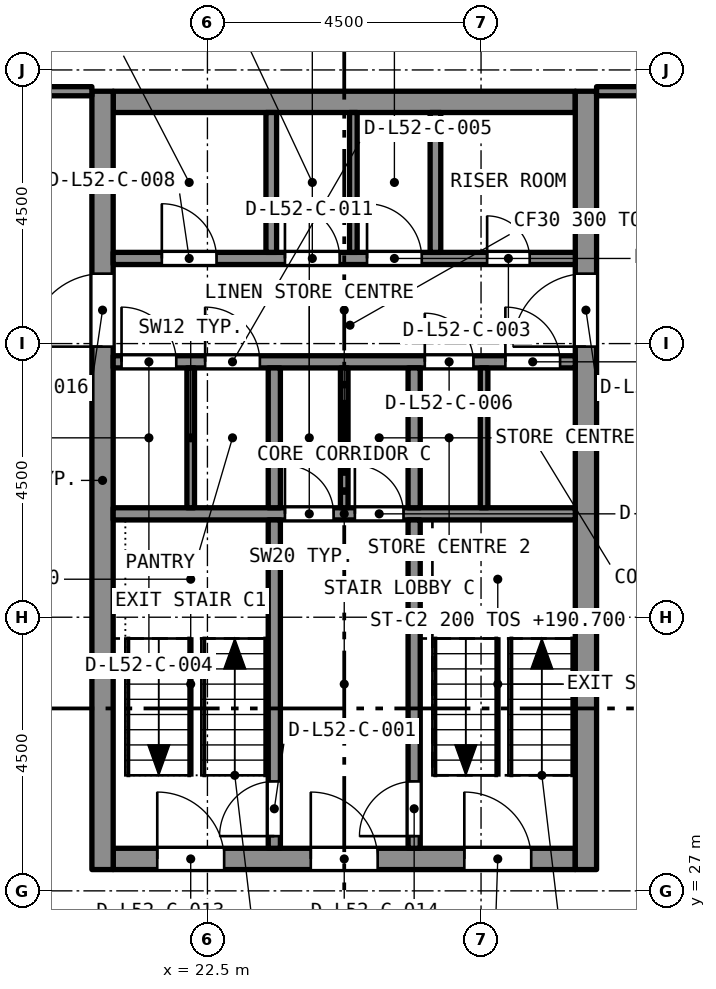
"""IFC4 building model, lengths in metres.
Left out: names, types, materials, properties, quantities, classifications, styles, units other than length and angle.
Written with IfcOpenShell. Run it as: python <this file> out.ifc"""

import sys

from ifc_helpers import new_model, si_unit, direction, frame, frame_2d, origin, place, context, subcontext, project, spatial, rectangle, extrude, element, fill, save


model = new_model("IFC4")
c1 = context("Model", 3, precision=1e-05, world=origin(), true_north=direction((0.0, 1.0)))
c2 = subcontext(c1, "Body", "Model", "MODEL_VIEW")
j1 = project(units=[si_unit("LENGTHUNIT", "METRE"), si_unit("PLANEANGLEUNIT", "RADIAN")], contexts=[c1])
p1 = place(None, origin())
s1 = spatial("IfcSite", under=j1, at=p1, CompositionType="ELEMENT")
p2 = place(p1, origin())
s2 = spatial("IfcBuilding", under=s1, at=p2, CompositionType="ELEMENT")
p3 = place(p2, frame((0.0, 0.0, 189.1)))
s3 = spatial("IfcBuildingStorey", under=s2, at=p3, CompositionType="ELEMENT", Elevation=189.1)
p4 = place(p3, frame((20.95, 27.525, 0.0), z_axis=(0.0, 0.0, 1.0), x_axis=(1.0, 0.0, 0.0)))
e1 = element("IfcWall", 1, at=p4, inside=s3, PredefinedType="SOLIDWALL", context=c2, shape_type="SweptSolid", body=[
    extrude(rectangle(XDim=7.6, YDim=0.35, at=frame_2d((3.8, 0.0))), origin(), (0.0, 0.0, 1.0), 3.2),
])
p5 = place(p4, frame((0.725, 0.0, 0.0)))
e2 = element("IfcOpeningElement", 2, at=p5, cuts=e1, PredefinedType="OPENING", context=c2, shape_type="SweptSolid", body=[
    extrude(rectangle(XDim=1.1, YDim=2.1, at=frame_2d((0.55, 1.05))), frame((0.0, 0.185, 0.0), z_axis=(0.0, -1.0, 0.0), x_axis=(1.0, 0.0, 0.0)), (0.0, 0.0, 1.0), 0.37),
])
p6 = place(p4, frame((3.25, 0.0, 0.0)))
e3 = element("IfcOpeningElement", 3, at=p6, cuts=e1, PredefinedType="OPENING", context=c2, shape_type="SweptSolid", body=[
    extrude(rectangle(XDim=1.1, YDim=2.1, at=frame_2d((0.55, 1.05))), frame((0.0, 0.185, 0.0), z_axis=(0.0, -1.0, 0.0), x_axis=(1.0, 0.0, 0.0)), (0.0, 0.0, 1.0), 0.37),
])
p7 = place(p4, frame((5.775, 0.0, 0.0)))
e4 = element("IfcOpeningElement", 4, at=p7, cuts=e1, PredefinedType="OPENING", context=c2, shape_type="SweptSolid", body=[
    extrude(rectangle(XDim=1.1, YDim=2.1, at=frame_2d((0.55, 1.05))), frame((0.0, 0.185, 0.0), z_axis=(0.0, -1.0, 0.0), x_axis=(1.0, 0.0, 0.0)), (0.0, 0.0, 1.0), 0.37),
])
p8 = place(p3, frame((20.95, 39.975, 0.0), z_axis=(0.0, 0.0, 1.0), x_axis=(1.0, 0.0, 0.0)))
e5 = element("IfcWall", 5, at=p8, inside=s3, PredefinedType="SOLIDWALL", context=c2, shape_type="SweptSolid", body=[
    extrude(rectangle(XDim=7.6, YDim=0.35, at=frame_2d((3.8, 0.0))), origin(), (0.0, 0.0, 1.0), 3.2),
])
p9 = place(p3, frame((20.775, 27.35, 0.0), z_axis=(0.0, 0.0, 1.0), x_axis=(0.0, 1.0, 0.0)))
e6 = element("IfcWall", 6, at=p9, inside=s3, PredefinedType="SOLIDWALL", context=c2, shape_type="SweptSolid", body=[
    extrude(rectangle(XDim=12.8, YDim=0.35, at=frame_2d((6.4, 0.0))), origin(), (0.0, 0.0, 1.0), 3.2),
])
p10 = place(p9, frame((8.6, 0.0, 0.0)))
e7 = element("IfcOpeningElement", 7, at=p10, cuts=e6, PredefinedType="OPENING", context=c2, shape_type="SweptSolid", body=[
    extrude(rectangle(XDim=1.2, YDim=2.1, at=frame_2d((0.6, 1.05))), frame((0.0, 0.185, 0.0), z_axis=(0.0, -1.0, 0.0), x_axis=(1.0, 0.0, 0.0)), (0.0, 0.0, 1.0), 0.37),
])
p11 = place(p3, frame((28.725, 27.35, 0.0), z_axis=(0.0, 0.0, 1.0), x_axis=(0.0, 1.0, 0.0)))
e8 = element("IfcWall", 8, at=p11, inside=s3, PredefinedType="SOLIDWALL", context=c2, shape_type="SweptSolid", body=[
    extrude(rectangle(XDim=12.8, YDim=0.35, at=frame_2d((6.4, 0.0))), origin(), (0.0, 0.0, 1.0), 3.2),
])
p12 = place(p11, frame((8.6, 0.0, 0.0)))
e9 = element("IfcOpeningElement", 9, at=p12, cuts=e8, PredefinedType="OPENING", context=c2, shape_type="SweptSolid", body=[
    extrude(rectangle(XDim=1.2, YDim=2.1, at=frame_2d((0.6, 1.05))), frame((0.0, 0.185, 0.0), z_axis=(0.0, -1.0, 0.0), x_axis=(1.0, 0.0, 0.0)), (0.0, 0.0, 1.0), 0.37),
])
p13 = place(p3, frame((18.4, 40.15, 0.0), z_axis=(0.0, 0.0, 1.0), x_axis=(1.0, 0.0, 0.0)))
e10 = element("IfcWall", 10, at=p13, inside=s3, PredefinedType="PARTITIONING", context=c2, shape_type="SweptSolid", body=[
    extrude(rectangle(XDim=2.2, YDim=0.15, at=frame_2d((1.1, 0.0))), origin(), (0.0, 0.0, 1.0), 2.75),
])
p14 = place(p13, frame((0.2, 0.0, 0.0)))
e11 = element("IfcOpeningElement", 11, at=p14, cuts=e10, PredefinedType="OPENING", context=c2, shape_type="SweptSolid", body=[
    extrude(rectangle(XDim=1.0, YDim=2.1, at=frame_2d((0.5, 1.05))), frame((0.0, 0.085, 0.0), z_axis=(0.0, -1.0, 0.0), x_axis=(1.0, 0.0, 0.0)), (0.0, 0.0, 1.0), 0.17),
])
p15 = place(p3, frame((28.9, 40.15, 0.0), z_axis=(0.0, 0.0, 1.0), x_axis=(1.0, 0.0, 0.0)))
e12 = element("IfcWall", 12, at=p15, inside=s3, PredefinedType="PARTITIONING", context=c2, shape_type="SweptSolid", body=[
    extrude(rectangle(XDim=2.2, YDim=0.15, at=frame_2d((1.1, 0.0))), origin(), (0.0, 0.0, 1.0), 2.75),
])
p16 = place(p3, frame((20.95, 33.2, 0.0), z_axis=(0.0, 0.0, 1.0), x_axis=(1.0, 0.0, 0.0)))
e13 = element("IfcWall", 13, at=p16, inside=s3, PredefinedType="SOLIDWALL", context=c2, shape_type="SweptSolid", body=[
    extrude(rectangle(XDim=7.6, YDim=0.2, at=frame_2d((3.8, 0.0))), origin(), (0.0, 0.0, 1.0), 2.9),
])
p17 = place(p16, frame((2.825, 0.0, 0.0)))
e14 = element("IfcOpeningElement", 14, at=p17, cuts=e13, PredefinedType="OPENING", context=c2, shape_type="SweptSolid", body=[
    extrude(rectangle(XDim=0.8, YDim=2.1, at=frame_2d((0.4, 1.05))), frame((0.0, 0.11, 0.0), z_axis=(0.0, -1.0, 0.0), x_axis=(1.0, 0.0, 0.0)), (0.0, 0.0, 1.0), 0.22),
])
p18 = place(p16, frame((3.975, 0.0, 0.0)))
e15 = element("IfcOpeningElement", 15, at=p18, cuts=e13, PredefinedType="OPENING", context=c2, shape_type="SweptSolid", body=[
    extrude(rectangle(XDim=0.8, YDim=2.1, at=frame_2d((0.4, 1.05))), frame((0.0, 0.11, 0.0), z_axis=(0.0, -1.0, 0.0), x_axis=(1.0, 0.0, 0.0)), (0.0, 0.0, 1.0), 0.22),
])
p19 = place(p3, frame((20.95, 35.7, 0.0), z_axis=(0.0, 0.0, 1.0), x_axis=(1.0, 0.0, 0.0)))
e16 = element("IfcWall", 16, at=p19, inside=s3, PredefinedType="SOLIDWALL", context=c2, shape_type="SweptSolid", body=[
    extrude(rectangle(XDim=7.6, YDim=0.2, at=frame_2d((3.8, 0.0))), origin(), (0.0, 0.0, 1.0), 2.9),
])
p20 = place(p19, frame((0.137, 0.0, 0.0)))
e17 = element("IfcOpeningElement", 17, at=p20, cuts=e16, PredefinedType="OPENING", context=c2, shape_type="SweptSolid", body=[
    extrude(rectangle(XDim=0.9, YDim=2.1, at=frame_2d((0.45, 1.05))), frame((0.0, 0.11, 0.0), z_axis=(0.0, -1.0, 0.0), x_axis=(1.0, 0.0, 0.0)), (0.0, 0.0, 1.0), 0.22),
])
p21 = place(p19, frame((1.512, 0.0, 0.0)))
e18 = element("IfcOpeningElement", 18, at=p21, cuts=e16, PredefinedType="OPENING", context=c2, shape_type="SweptSolid", body=[
    extrude(rectangle(XDim=0.9, YDim=2.1, at=frame_2d((0.45, 1.05))), frame((0.0, 0.11, 0.0), z_axis=(0.0, -1.0, 0.0), x_axis=(1.0, 0.0, 0.0)), (0.0, 0.0, 1.0), 0.22),
])
p22 = place(p19, frame((5.125, 0.0, 0.0)))
e19 = element("IfcOpeningElement", 19, at=p22, cuts=e16, PredefinedType="OPENING", context=c2, shape_type="SweptSolid", body=[
    extrude(rectangle(XDim=0.8, YDim=2.1, at=frame_2d((0.4, 1.05))), frame((0.0, 0.11, 0.0), z_axis=(0.0, -1.0, 0.0), x_axis=(1.0, 0.0, 0.0)), (0.0, 0.0, 1.0), 0.22),
])
p23 = place(p19, frame((6.45, 0.0, 0.0)))
e20 = element("IfcOpeningElement", 20, at=p23, cuts=e16, PredefinedType="OPENING", context=c2, shape_type="SweptSolid", body=[
    extrude(rectangle(XDim=0.9, YDim=2.1, at=frame_2d((0.45, 1.05))), frame((0.0, 0.11, 0.0), z_axis=(0.0, -1.0, 0.0), x_axis=(1.0, 0.0, 0.0)), (0.0, 0.0, 1.0), 0.22),
])
p24 = place(p3, frame((20.95, 37.4, 0.0), z_axis=(0.0, 0.0, 1.0), x_axis=(1.0, 0.0, 0.0)))
e21 = element("IfcWall", 21, at=p24, inside=s3, PredefinedType="SOLIDWALL", context=c2, shape_type="SweptSolid", body=[
    extrude(rectangle(XDim=7.6, YDim=0.2, at=frame_2d((3.8, 0.0))), origin(), (0.0, 0.0, 1.0), 2.9),
])
p25 = place(p24, frame((6.15, 0.0, 0.0)))
e22 = element("IfcOpeningElement", 22, at=p25, cuts=e21, PredefinedType="OPENING", context=c2, shape_type="SweptSolid", body=[
    extrude(rectangle(XDim=0.7, YDim=2.1, at=frame_2d((0.35, 1.05))), frame((0.0, 0.11, 0.0), z_axis=(0.0, -1.0, 0.0), x_axis=(1.0, 0.0, 0.0)), (0.0, 0.0, 1.0), 0.22),
])
p26 = place(p24, frame((0.8, 0.0, 0.0)))
e23 = element("IfcOpeningElement", 23, at=p26, cuts=e21, PredefinedType="OPENING", context=c2, shape_type="SweptSolid", body=[
    extrude(rectangle(XDim=0.9, YDim=2.1, at=frame_2d((0.45, 1.05))), frame((0.0, 0.11, 0.0), z_axis=(0.0, -1.0, 0.0), x_axis=(1.0, 0.0, 0.0)), (0.0, 0.0, 1.0), 0.22),
])
p27 = place(p24, frame((2.825, 0.0, 0.0)))
e24 = element("IfcOpeningElement", 24, at=p27, cuts=e21, PredefinedType="OPENING", context=c2, shape_type="SweptSolid", body=[
    extrude(rectangle(XDim=0.9, YDim=2.1, at=frame_2d((0.45, 1.05))), frame((0.0, 0.11, 0.0), z_axis=(0.0, -1.0, 0.0), x_axis=(1.0, 0.0, 0.0)), (0.0, 0.0, 1.0), 0.22),
])
p28 = place(p24, frame((4.175, 0.0, 0.0)))
e25 = element("IfcOpeningElement", 25, at=p28, cuts=e21, PredefinedType="OPENING", context=c2, shape_type="SweptSolid", body=[
    extrude(rectangle(XDim=0.9, YDim=2.1, at=frame_2d((0.45, 1.05))), frame((0.0, 0.11, 0.0), z_axis=(0.0, -1.0, 0.0), x_axis=(1.0, 0.0, 0.0)), (0.0, 0.0, 1.0), 0.22),
])
p29 = place(p3, frame((23.6, 27.7, 0.0), z_axis=(0.0, 0.0, 1.0), x_axis=(0.0, 1.0, 0.0)))
e26 = element("IfcWall", 26, at=p29, inside=s3, PredefinedType="SOLIDWALL", context=c2, shape_type="SweptSolid", body=[
    extrude(rectangle(XDim=5.4, YDim=0.2, at=frame_2d((2.7, 0.0))), origin(), (0.0, 0.0, 1.0), 2.9),
])
p30 = place(p29, frame((0.2, 0.0, 0.0)))
e27 = element("IfcOpeningElement", 27, at=p30, cuts=e26, PredefinedType="OPENING", context=c2, shape_type="SweptSolid", body=[
    extrude(rectangle(XDim=0.9, YDim=2.1, at=frame_2d((0.45, 1.05))), frame((0.0, 0.11, 0.0), z_axis=(0.0, -1.0, 0.0), x_axis=(1.0, 0.0, 0.0)), (0.0, 0.0, 1.0), 0.22),
])
p31 = place(p3, frame((25.9, 27.7, 0.0), z_axis=(0.0, 0.0, 1.0), x_axis=(0.0, 1.0, 0.0)))
e28 = element("IfcWall", 28, at=p31, inside=s3, PredefinedType="SOLIDWALL", context=c2, shape_type="SweptSolid", body=[
    extrude(rectangle(XDim=5.4, YDim=0.2, at=frame_2d((2.7, 0.0))), origin(), (0.0, 0.0, 1.0), 2.9),
])
p32 = place(p31, frame((0.2, 0.0, 0.0)))
e29 = element("IfcOpeningElement", 29, at=p32, cuts=e28, PredefinedType="OPENING", context=c2, shape_type="SweptSolid", body=[
    extrude(rectangle(XDim=0.9, YDim=2.1, at=frame_2d((0.45, 1.05))), frame((0.0, 0.11, 0.0), z_axis=(0.0, -1.0, 0.0), x_axis=(1.0, 0.0, 0.0)), (0.0, 0.0, 1.0), 0.22),
])
for number, where, z_axis, x_axis in (
    (30, (23.6, 33.3, 0.0), (0.0, 0.0, 1.0), (0.0, 1.0, 0.0)),
    (31, (25.9, 33.3, 0.0), (0.0, 0.0, 1.0), (0.0, 1.0, 0.0)),
):
    element("IfcWall", number, at=place(p3, frame(where, z_axis=z_axis, x_axis=x_axis)), inside=s3, PredefinedType="SOLIDWALL", context=c2, shape_type="SweptSolid", body=[
        extrude(rectangle(XDim=2.3, YDim=0.2, at=frame_2d((1.15, 0.0))), origin(), (0.0, 0.0, 1.0), 2.9),
    ])
for number, where, z_axis, x_axis in (
    (32, (23.55, 37.5, 0.0), (0.0, 0.0, 1.0), (0.0, 1.0, 0.0)),
    (33, (26.25, 37.5, 0.0), (0.0, 0.0, 1.0), (0.0, 1.0, 0.0)),
):
    element("IfcWall", number, at=place(p3, frame(where, z_axis=z_axis, x_axis=x_axis)), inside=s3, PredefinedType="SOLIDWALL", context=c2, shape_type="SweptSolid", body=[
        extrude(rectangle(XDim=2.3, YDim=0.175, at=frame_2d((1.15, 0.0))), origin(), (0.0, 0.0, 1.0), 2.9),
    ])
for number, where, z_axis, x_axis in (
    (34, (22.225, 33.3, 0.0), (0.0, 0.0, 1.0), (0.0, 1.0, 0.0)),
    (35, (27.05, 33.3, 0.0), (0.0, 0.0, 1.0), (0.0, 1.0, 0.0)),
    (36, (24.9, 37.5, 0.0), (0.0, 0.0, 1.0), (0.0, 1.0, 0.0)),
    (37, (24.75, 33.3, 0.0), (0.0, 0.0, 1.0), (0.0, 1.0, 0.0)),
):
    element("IfcWall", number, at=place(p3, frame(where, z_axis=z_axis, x_axis=x_axis)), inside=s3, PredefinedType="PARTITIONING", context=c2, shape_type="SweptSolid", body=[
        extrude(rectangle(XDim=2.3, YDim=0.125, at=frame_2d((1.15, 0.0))), origin(), (0.0, 0.0, 1.0), 2.9),
    ])
p33 = place(p30, origin())
e38 = element("IfcDoor", 38, at=p33, inside=s3, OperationType="SINGLE_SWING_LEFT", PredefinedType="DOOR", context=c2, shape_type="SweptSolid", body=[
    extrude(rectangle(XDim=0.9, YDim=2.1, at=frame_2d((0.45, 1.05))), frame((0.0, 0.025, 0.0), z_axis=(0.0, -1.0, 0.0), x_axis=(1.0, 0.0, 0.0)), (0.0, 0.0, 1.0), 0.05),
])
fill(e27, e38)
p34 = place(p32, origin())
e39 = element("IfcDoor", 39, at=p34, inside=s3, OperationType="SINGLE_SWING_LEFT", PredefinedType="DOOR", context=c2, shape_type="SweptSolid", body=[
    extrude(rectangle(XDim=0.9, YDim=2.1, at=frame_2d((0.45, 1.05))), frame((0.0, 0.025, 0.0), z_axis=(0.0, -1.0, 0.0), x_axis=(1.0, 0.0, 0.0)), (0.0, 0.0, 1.0), 0.05),
])
fill(e29, e39)
p35 = place(p25, origin())
e40 = element("IfcDoor", 40, at=p35, inside=s3, OperationType="SINGLE_SWING_LEFT", PredefinedType="DOOR", context=c2, shape_type="SweptSolid", body=[
    extrude(rectangle(XDim=0.7, YDim=2.1, at=frame_2d((0.35, 1.05))), frame((0.0, 0.025, 0.0), z_axis=(0.0, -1.0, 0.0), x_axis=(1.0, 0.0, 0.0)), (0.0, 0.0, 1.0), 0.05),
])
fill(e22, e40)
p36 = place(p20, origin())
e41 = element("IfcDoor", 41, at=p36, inside=s3, OperationType="SINGLE_SWING_LEFT", PredefinedType="DOOR", context=c2, shape_type="SweptSolid", body=[
    extrude(rectangle(XDim=0.9, YDim=2.1, at=frame_2d((0.45, 1.05))), frame((0.0, 0.025, 0.0), z_axis=(0.0, -1.0, 0.0), x_axis=(1.0, 0.0, 0.0)), (0.0, 0.0, 1.0), 0.05),
])
fill(e17, e41)
p37 = place(p21, origin())
e42 = element("IfcDoor", 42, at=p37, inside=s3, OperationType="SINGLE_SWING_LEFT", PredefinedType="DOOR", context=c2, shape_type="SweptSolid", body=[
    extrude(rectangle(XDim=0.9, YDim=2.1, at=frame_2d((0.45, 1.05))), frame((0.0, 0.025, 0.0), z_axis=(0.0, -1.0, 0.0), x_axis=(1.0, 0.0, 0.0)), (0.0, 0.0, 1.0), 0.05),
])
fill(e18, e42)
p38 = place(p22, origin())
e43 = element("IfcDoor", 43, at=p38, inside=s3, OperationType="SINGLE_SWING_LEFT", PredefinedType="DOOR", context=c2, shape_type="SweptSolid", body=[
    extrude(rectangle(XDim=0.8, YDim=2.1, at=frame_2d((0.4, 1.05))), frame((0.0, 0.025, 0.0), z_axis=(0.0, -1.0, 0.0), x_axis=(1.0, 0.0, 0.0)), (0.0, 0.0, 1.0), 0.05),
])
fill(e19, e43)
p39 = place(p23, origin())
e44 = element("IfcDoor", 44, at=p39, inside=s3, OperationType="SINGLE_SWING_LEFT", PredefinedType="DOOR", context=c2, shape_type="SweptSolid", body=[
    extrude(rectangle(XDim=0.9, YDim=2.1, at=frame_2d((0.45, 1.05))), frame((0.0, 0.025, 0.0), z_axis=(0.0, -1.0, 0.0), x_axis=(1.0, 0.0, 0.0)), (0.0, 0.0, 1.0), 0.05),
])
fill(e20, e44)
p40 = place(p26, origin())
e45 = element("IfcDoor", 45, at=p40, inside=s3, OperationType="SINGLE_SWING_LEFT", PredefinedType="DOOR", context=c2, shape_type="SweptSolid", body=[
    extrude(rectangle(XDim=0.9, YDim=2.1, at=frame_2d((0.45, 1.05))), frame((0.0, 0.025, 0.0), z_axis=(0.0, -1.0, 0.0), x_axis=(1.0, 0.0, 0.0)), (0.0, 0.0, 1.0), 0.05),
])
fill(e23, e45)
p41 = place(p27, origin())
e46 = element("IfcDoor", 46, at=p41, inside=s3, OperationType="SINGLE_SWING_LEFT", PredefinedType="DOOR", context=c2, shape_type="SweptSolid", body=[
    extrude(rectangle(XDim=0.9, YDim=2.1, at=frame_2d((0.45, 1.05))), frame((0.0, 0.025, 0.0), z_axis=(0.0, -1.0, 0.0), x_axis=(1.0, 0.0, 0.0)), (0.0, 0.0, 1.0), 0.05),
])
fill(e24, e46)
p42 = place(p28, origin())
e47 = element("IfcDoor", 47, at=p42, inside=s3, OperationType="SINGLE_SWING_LEFT", PredefinedType="DOOR", context=c2, shape_type="SweptSolid", body=[
    extrude(rectangle(XDim=0.9, YDim=2.1, at=frame_2d((0.45, 1.05))), frame((0.0, 0.025, 0.0), z_axis=(0.0, -1.0, 0.0), x_axis=(1.0, 0.0, 0.0)), (0.0, 0.0, 1.0), 0.05),
])
fill(e25, e47)
p43 = place(p17, origin())
e48 = element("IfcDoor", 48, at=p43, inside=s3, OperationType="SINGLE_SWING_LEFT", PredefinedType="DOOR", context=c2, shape_type="SweptSolid", body=[
    extrude(rectangle(XDim=0.8, YDim=2.1, at=frame_2d((0.4, 1.05))), frame((0.0, 0.025, 0.0), z_axis=(0.0, -1.0, 0.0), x_axis=(1.0, 0.0, 0.0)), (0.0, 0.0, 1.0), 0.05),
])
fill(e14, e48)
p44 = place(p18, origin())
e49 = element("IfcDoor", 49, at=p44, inside=s3, OperationType="SINGLE_SWING_LEFT", PredefinedType="DOOR", context=c2, shape_type="SweptSolid", body=[
    extrude(rectangle(XDim=0.8, YDim=2.1, at=frame_2d((0.4, 1.05))), frame((0.0, 0.025, 0.0), z_axis=(0.0, -1.0, 0.0), x_axis=(1.0, 0.0, 0.0)), (0.0, 0.0, 1.0), 0.05),
])
fill(e15, e49)
p45 = place(p5, origin())
e50 = element("IfcDoor", 50, at=p45, inside=s3, OperationType="SINGLE_SWING_LEFT", PredefinedType="DOOR", context=c2, shape_type="SweptSolid", body=[
    extrude(rectangle(XDim=1.1, YDim=2.1, at=frame_2d((0.55, 1.05))), frame((0.0, 0.025, 0.0), z_axis=(0.0, -1.0, 0.0), x_axis=(1.0, 0.0, 0.0)), (0.0, 0.0, 1.0), 0.05),
])
fill(e2, e50)
p46 = place(p6, origin())
e51 = element("IfcDoor", 51, at=p46, inside=s3, OperationType="SINGLE_SWING_LEFT", PredefinedType="DOOR", context=c2, shape_type="SweptSolid", body=[
    extrude(rectangle(XDim=1.1, YDim=2.1, at=frame_2d((0.55, 1.05))), frame((0.0, 0.025, 0.0), z_axis=(0.0, -1.0, 0.0), x_axis=(1.0, 0.0, 0.0)), (0.0, 0.0, 1.0), 0.05),
])
fill(e3, e51)
p47 = place(p7, origin())
e52 = element("IfcDoor", 52, at=p47, inside=s3, OperationType="SINGLE_SWING_LEFT", PredefinedType="DOOR", context=c2, shape_type="SweptSolid", body=[
    extrude(rectangle(XDim=1.1, YDim=2.1, at=frame_2d((0.55, 1.05))), frame((0.0, 0.025, 0.0), z_axis=(0.0, -1.0, 0.0), x_axis=(1.0, 0.0, 0.0)), (0.0, 0.0, 1.0), 0.05),
])
fill(e4, e52)
p48 = place(p10, origin())
e53 = element("IfcDoor", 53, at=p48, inside=s3, OperationType="SINGLE_SWING_LEFT", PredefinedType="DOOR", context=c2, shape_type="SweptSolid", body=[
    extrude(rectangle(XDim=1.2, YDim=2.1, at=frame_2d((0.6, 1.05))), frame((0.0, 0.025, 0.0), z_axis=(0.0, -1.0, 0.0), x_axis=(1.0, 0.0, 0.0)), (0.0, 0.0, 1.0), 0.05),
])
fill(e7, e53)
p49 = place(p12, origin())
e54 = element("IfcDoor", 54, at=p49, inside=s3, OperationType="SINGLE_SWING_LEFT", PredefinedType="DOOR", context=c2, shape_type="SweptSolid", body=[
    extrude(rectangle(XDim=1.2, YDim=2.1, at=frame_2d((0.6, 1.05))), frame((0.0, 0.025, 0.0), z_axis=(0.0, -1.0, 0.0), x_axis=(1.0, 0.0, 0.0)), (0.0, 0.0, 1.0), 0.05),
])
fill(e9, e54)
save(model, sys.argv[1])
